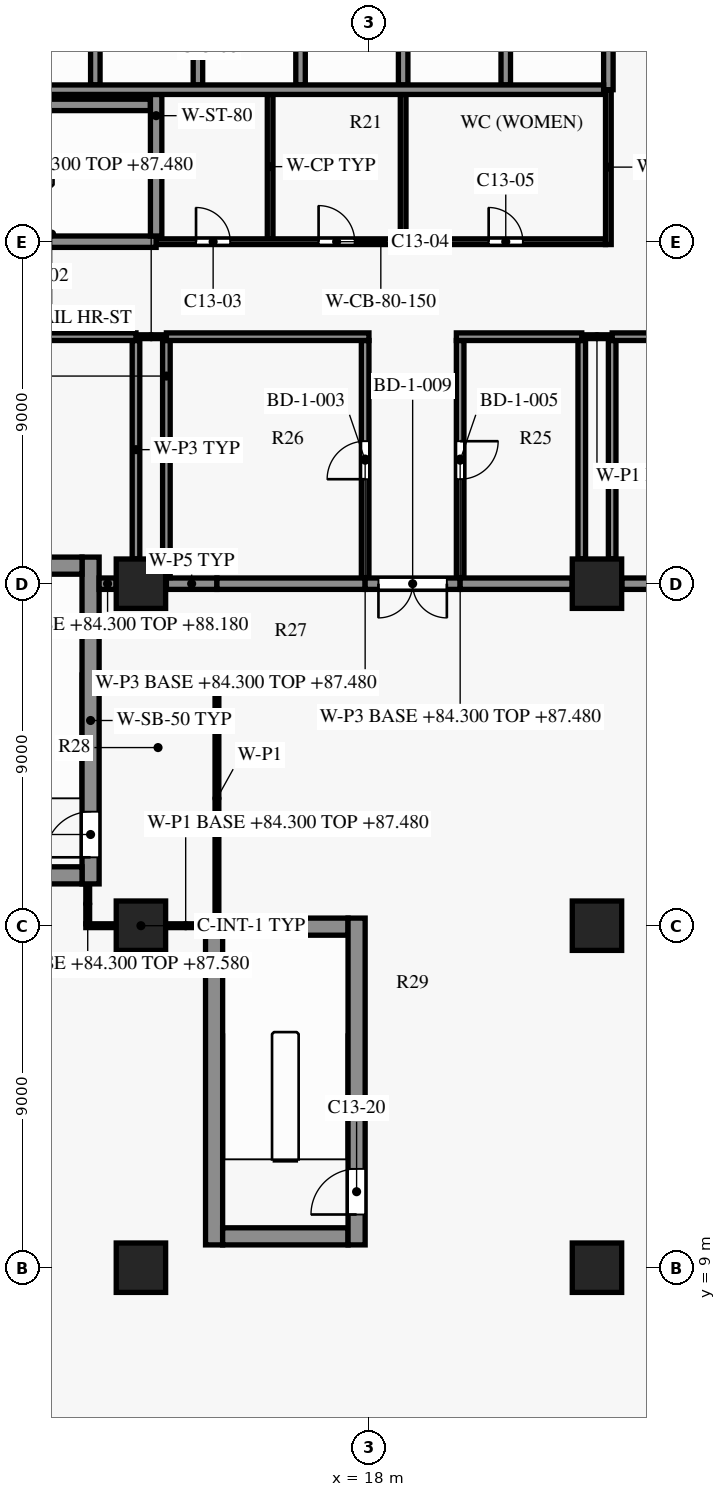
"""IFC4 building model, lengths in metres.
Left out: names, types, materials, properties, quantities, classifications, styles, units other than length and angle.
Written with IfcOpenShell. Run it as: python <this file> out.ifc"""

import sys

from ifc_helpers import new_model, si_unit, direction, frame, frame_2d, origin, origin_2d, place, context, subcontext, project, spatial, rectangle, extrude, element, fill, save


model = new_model("IFC4")
c1 = context("Model", 3, precision=1e-05, world=origin(), true_north=direction((0.0, 1.0)))
c2 = subcontext(c1, "Body", "Model", "MODEL_VIEW")
j1 = project(units=[si_unit("LENGTHUNIT", "METRE"), si_unit("PLANEANGLEUNIT", "RADIAN")], contexts=[c1])
p1 = place(None, origin())
s1 = spatial("IfcSite", under=j1, at=p1, CompositionType="ELEMENT")
p2 = place(p1, origin())
s2 = spatial("IfcBuilding", under=s1, at=p2, CompositionType="ELEMENT")
p3 = place(p2, frame((0.0, 0.0, 84.3)))
s3 = spatial("IfcBuildingStorey", under=s2, at=p3, CompositionType="ELEMENT", Elevation=84.3)
for number, where, z_axis, x_axis in (
    (1, (12.0, 9.0, 0.0), (0.0, 0.0, 1.0), (1.0, 0.0, 0.0)),
    (2, (12.0, 18.0, 0.0), (0.0, 0.0, 1.0), (1.0, 0.0, 0.0)),
    (3, (12.0, 27.0, 0.0), (0.0, 0.0, 1.0), (1.0, 0.0, 0.0)),
    (4, (24.0, 9.0, 0.0), (0.0, 0.0, 1.0), (1.0, 0.0, 0.0)),
    (5, (24.0, 18.0, 0.0), (0.0, 0.0, 1.0), (1.0, 0.0, 0.0)),
    (6, (24.0, 27.0, 0.0), (0.0, 0.0, 1.0), (1.0, 0.0, 0.0)),
):
    element("IfcColumn", number, at=place(p3, frame(where, z_axis=z_axis, x_axis=x_axis)), inside=s3, PredefinedType="COLUMN", context=c2, shape_type="SweptSolid", body=[
        extrude(rectangle(XDim=1.3, YDim=1.3, at=origin_2d()), origin(), (0.0, 0.0, 1.0), 4.2),
    ])
for number, where, z_axis, x_axis in (
    (7, (14.15, 9.825, 0.0), (0.0, 0.0, 1.0), (1.0, 0.0, 0.0)),
    (8, (14.15, 17.975, 0.0), (0.0, 0.0, 1.0), (1.0, 0.0, 0.0)),
    (9, (7.15, 19.325, 0.0), (0.0, 0.0, 1.0), (1.0, 0.0, 0.0)),
    (10, (7.15, 27.475, 0.0), (0.0, 0.0, 1.0), (1.0, 0.0, 0.0)),
):
    element("IfcWall", number, at=place(p3, frame(where, z_axis=z_axis, x_axis=x_axis)), inside=s3, PredefinedType="SHEAR", context=c2, shape_type="SweptSolid", body=[
        extrude(rectangle(XDim=3.3, YDim=0.45, at=frame_2d((1.65, 0.0))), origin(), (0.0, 0.0, 1.0), 3.9),
    ])
p4 = place(p3, frame((12.4, 36.0, 0.0), z_axis=(0.0, 0.0, 1.0), x_axis=(1.0, 0.0, 0.0)))
e11 = element("IfcWall", 11, at=p4, inside=s3, PredefinedType="SHEAR", context=c2, shape_type="SweptSolid", body=[
    extrude(rectangle(XDim=11.825, YDim=0.15, at=frame_2d((5.913, 0.0))), origin(), (0.0, 0.0, 1.0), 3.9),
])
p5 = place(p4, frame((1.05, 0.0, 0.0)))
e12 = element("IfcOpeningElement", 12, at=p5, cuts=e11, PredefinedType="OPENING", context=c2, shape_type="SweptSolid", body=[
    extrude(rectangle(XDim=0.9, YDim=2.1, at=frame_2d((0.45, 1.05))), frame((0.0, 0.085, 0.0), z_axis=(0.0, -1.0, 0.0), x_axis=(1.0, 0.0, 0.0)), (0.0, 0.0, 1.0), 0.17),
])
p6 = place(p4, frame((4.275, 0.0, 0.0)))
e13 = element("IfcOpeningElement", 13, at=p6, cuts=e11, PredefinedType="OPENING", context=c2, shape_type="SweptSolid", body=[
    extrude(rectangle(XDim=0.95, YDim=2.1, at=frame_2d((0.475, 1.05))), frame((0.0, 0.085, 0.0), z_axis=(0.0, -1.0, 0.0), x_axis=(1.0, 0.0, 0.0)), (0.0, 0.0, 1.0), 0.17),
])
p7 = place(p4, frame((8.75, 0.0, 0.0)))
e14 = element("IfcOpeningElement", 14, at=p7, cuts=e11, PredefinedType="OPENING", context=c2, shape_type="SweptSolid", body=[
    extrude(rectangle(XDim=0.9, YDim=2.1, at=frame_2d((0.45, 1.05))), frame((0.0, 0.085, 0.0), z_axis=(0.0, -1.0, 0.0), x_axis=(1.0, 0.0, 0.0)), (0.0, 0.0, 1.0), 0.17),
])
p8 = place(p3, frame((4.55, 36.0, 0.0), z_axis=(0.0, 0.0, 1.0), x_axis=(1.0, 0.0, 0.0)))
e15 = element("IfcWall", 15, at=p8, inside=s3, PredefinedType="SHEAR", context=c2, shape_type="SweptSolid", body=[
    extrude(rectangle(XDim=7.85, YDim=0.3, at=frame_2d((3.925, 0.0))), origin(), (0.0, 0.0, 1.0), 3.9),
])
p9 = place(p8, frame((0.15, 0.0, 0.0)))
e16 = element("IfcOpeningElement", 16, at=p9, cuts=e15, PredefinedType="OPENING", context=c2, shape_type="SweptSolid", body=[
    extrude(rectangle(XDim=1.5, YDim=2.2, at=frame_2d((0.75, 1.1))), frame((0.0, 0.16, 0.0), z_axis=(0.0, -1.0, 0.0), x_axis=(1.0, 0.0, 0.0)), (0.0, 0.0, 1.0), 0.32),
])
p10 = place(p3, frame((4.55, 39.6, 0.0), z_axis=(0.0, 0.0, 1.0), x_axis=(1.0, 0.0, 0.0)))
e17 = element("IfcWall", 17, at=p10, inside=s3, PredefinedType="SHEAR", context=c2, shape_type="SweptSolid", body=[
    extrude(rectangle(XDim=7.7, YDim=0.3, at=frame_2d((3.85, 0.0))), origin(), (0.0, 0.0, 1.0), 3.9),
])
p11 = place(p3, frame((8.1, 40.0, 0.0), z_axis=(0.0, 0.0, 1.0), x_axis=(1.0, 0.0, 0.0)))
e18 = element("IfcWall", 18, at=p11, inside=s3, PredefinedType="SHEAR", context=c2, shape_type="SweptSolid", body=[
    extrude(rectangle(XDim=16.075, YDim=0.25, at=frame_2d((8.038, 0.0))), origin(), (0.0, 0.0, 1.0), 3.9),
])
p12 = place(p3, frame((10.675, 19.1, 0.0), z_axis=(0.0, 0.0, 1.0), x_axis=(0.0, 1.0, 0.0)))
e19 = element("IfcWall", 19, at=p12, inside=s3, PredefinedType="SHEAR", context=c2, shape_type="SweptSolid", body=[
    extrude(rectangle(XDim=8.6, YDim=0.45, at=frame_2d((4.3, 0.0))), origin(), (0.0, 0.0, 1.0), 3.9),
])
p13 = place(p12, frame((0.7, 0.0, 0.0)))
e20 = element("IfcOpeningElement", 20, at=p13, cuts=e19, PredefinedType="OPENING", context=c2, shape_type="SweptSolid", body=[
    extrude(rectangle(XDim=1.2, YDim=2.2, at=frame_2d((0.6, 1.1))), frame((0.0, 0.235, 0.0), z_axis=(0.0, -1.0, 0.0), x_axis=(1.0, 0.0, 0.0)), (0.0, 0.0, 1.0), 0.47),
])
p14 = place(p3, frame((10.8, 40.125, 0.0), z_axis=(0.0, 0.0, 1.0), x_axis=(0.0, 1.0, 0.0)))
e21 = element("IfcWall", 21, at=p14, inside=s3, PredefinedType="SHEAR", context=c2, shape_type="SweptSolid", body=[
    extrude(rectangle(XDim=2.95, YDim=0.25, at=frame_2d((1.475, 0.0))), origin(), (0.0, 0.0, 1.0), 3.9),
])
p15 = place(p3, frame((12.4, 36.15, 0.0), z_axis=(0.0, 0.0, 1.0), x_axis=(0.0, 1.0, 0.0)))
e22 = element("IfcWall", 22, at=p15, inside=s3, PredefinedType="SHEAR", context=c2, shape_type="SweptSolid", body=[
    extrude(rectangle(XDim=3.725, YDim=0.3, at=frame_2d((1.863, 0.0))), origin(), (0.0, 0.0, 1.0), 3.9),
])
p16 = place(p3, frame((13.5, 40.125, 0.0), z_axis=(0.0, 0.0, 1.0), x_axis=(0.0, 1.0, 0.0)))
e23 = element("IfcWall", 23, at=p16, inside=s3, PredefinedType="SHEAR", context=c2, shape_type="SweptSolid", body=[
    extrude(rectangle(XDim=2.95, YDim=0.25, at=frame_2d((1.475, 0.0))), origin(), (0.0, 0.0, 1.0), 3.9),
])
p17 = place(p3, frame((13.925, 9.6, 0.0), z_axis=(0.0, 0.0, 1.0), x_axis=(0.0, 1.0, 0.0)))
e24 = element("IfcWall", 24, at=p17, inside=s3, PredefinedType="SHEAR", context=c2, shape_type="SweptSolid", body=[
    extrude(rectangle(XDim=8.6, YDim=0.45, at=frame_2d((4.3, 0.0))), origin(), (0.0, 0.0, 1.0), 3.9),
])
p18 = place(p3, frame((15.4, 36.075, 0.0), z_axis=(0.0, 0.0, 1.0), x_axis=(0.0, 1.0, 0.0)))
e25 = element("IfcWall", 25, at=p18, inside=s3, PredefinedType="PARTITIONING", context=c2, shape_type="SweptSolid", body=[
    extrude(rectangle(XDim=3.8, YDim=0.15, at=frame_2d((1.9, 0.0))), origin(), (0.0, 0.0, 1.0), 3.9),
])
p19 = place(p3, frame((16.2, 40.125, 0.0), z_axis=(0.0, 0.0, 1.0), x_axis=(0.0, 1.0, 0.0)))
e26 = element("IfcWall", 26, at=p19, inside=s3, PredefinedType="SHEAR", context=c2, shape_type="SweptSolid", body=[
    extrude(rectangle(XDim=2.95, YDim=0.25, at=frame_2d((1.475, 0.0))), origin(), (0.0, 0.0, 1.0), 3.9),
])
p20 = place(p3, frame((17.675, 9.6, 0.0), z_axis=(0.0, 0.0, 1.0), x_axis=(0.0, 1.0, 0.0)))
e27 = element("IfcWall", 27, at=p20, inside=s3, PredefinedType="SHEAR", context=c2, shape_type="SweptSolid", body=[
    extrude(rectangle(XDim=8.6, YDim=0.45, at=frame_2d((4.3, 0.0))), origin(), (0.0, 0.0, 1.0), 3.9),
])
p21 = place(p20, frame((0.8, 0.0, 0.0)))
e28 = element("IfcOpeningElement", 28, at=p21, cuts=e27, PredefinedType="OPENING", context=c2, shape_type="SweptSolid", body=[
    extrude(rectangle(XDim=1.2, YDim=2.2, at=frame_2d((0.6, 1.1))), frame((0.0, 0.235, 0.0), z_axis=(0.0, -1.0, 0.0), x_axis=(1.0, 0.0, 0.0)), (0.0, 0.0, 1.0), 0.47),
])
p22 = place(p3, frame((18.9, 36.075, 0.0), z_axis=(0.0, 0.0, 1.0), x_axis=(0.0, 1.0, 0.0)))
e29 = element("IfcWall", 29, at=p22, inside=s3, PredefinedType="PARTITIONING", context=c2, shape_type="SweptSolid", body=[
    extrude(rectangle(XDim=3.8, YDim=0.15, at=frame_2d((1.9, 0.0))), origin(), (0.0, 0.0, 1.0), 3.9),
])
for number, where, z_axis, x_axis in (
    (30, (18.9, 40.125, 0.0), (0.0, 0.0, 1.0), (0.0, 1.0, 0.0)),
    (31, (21.6, 40.125, 0.0), (0.0, 0.0, 1.0), (0.0, 1.0, 0.0)),
):
    element("IfcWall", number, at=place(p3, frame(where, z_axis=z_axis, x_axis=x_axis)), inside=s3, PredefinedType="SHEAR", context=c2, shape_type="SweptSolid", body=[
        extrude(rectangle(XDim=2.95, YDim=0.25, at=frame_2d((1.475, 0.0))), origin(), (0.0, 0.0, 1.0), 3.9),
    ])
p23 = place(p3, frame((24.3, 35.925, 0.0), z_axis=(0.0, 0.0, 1.0), x_axis=(0.0, 1.0, 0.0)))
e32 = element("IfcWall", 32, at=p23, inside=s3, PredefinedType="SHEAR", context=c2, shape_type="SweptSolid", body=[
    extrude(rectangle(XDim=4.075, YDim=0.15, at=frame_2d((2.038, 0.0))), origin(), (0.0, 0.0, 1.0), 3.9),
])
p24 = place(p3, frame((24.3, 40.0, 0.0), z_axis=(0.0, 0.0, 1.0), x_axis=(0.0, 1.0, 0.0)))
e33 = element("IfcWall", 33, at=p24, inside=s3, PredefinedType="SHEAR", context=c2, shape_type="SweptSolid", body=[
    extrude(rectangle(XDim=3.325, YDim=0.25, at=frame_2d((1.663, 0.0))), origin(), (0.0, 0.0, 1.0), 3.9),
])
p25 = place(p3, frame((11.345, 18.0, 0.0), z_axis=(0.0, 0.0, 1.0), x_axis=(-1.0, 0.0, 0.0)))
e34 = element("IfcWall", 34, at=p25, inside=s3, PredefinedType="PARTITIONING", context=c2, shape_type="SweptSolid", body=[
    extrude(rectangle(XDim=0.795, YDim=0.1, at=frame_2d((0.397, 0.0))), origin(), (0.0, 0.0, 1.0), 3.28),
])
p26 = place(p3, frame((13.7, 18.0, 0.0), z_axis=(0.0, 0.0, 1.0), x_axis=(-1.0, 0.0, 0.0)))
e35 = element("IfcWall", 35, at=p26, inside=s3, PredefinedType="PARTITIONING", context=c2, shape_type="SweptSolid", body=[
    extrude(rectangle(XDim=1.045, YDim=0.1, at=frame_2d((0.522, 0.0))), origin(), (0.0, 0.0, 1.0), 3.18),
])
p27 = place(p3, frame((10.6, 18.05, 0.0), z_axis=(0.0, 0.0, 1.0), x_axis=(0.0, 1.0, 0.0)))
e36 = element("IfcWall", 36, at=p27, inside=s3, PredefinedType="PARTITIONING", context=c2, shape_type="SweptSolid", body=[
    extrude(rectangle(XDim=1.05, YDim=0.1, at=frame_2d((0.525, 0.0))), origin(), (0.0, 0.0, 1.0), 3.28),
])
p28 = place(p3, frame((14.0, 24.5, 0.0), z_axis=(0.0, 0.0, 1.0), x_axis=(0.0, -1.0, 0.0)))
e37 = element("IfcWall", 37, at=p28, inside=s3, PredefinedType="PARTITIONING", context=c2, shape_type="SweptSolid", body=[
    extrude(rectangle(XDim=6.3, YDim=0.1, at=frame_2d((3.15, 0.0))), origin(), (0.0, 0.0, 1.0), 3.88),
])
p29 = place(p3, frame((10.9, 27.0, 0.0), z_axis=(0.0, 0.0, 1.0), x_axis=(1.0, 0.0, 0.0)))
e38 = element("IfcWall", 38, at=p29, inside=s3, PredefinedType="PARTITIONING", context=c2, shape_type="SweptSolid", body=[
    extrude(rectangle(XDim=0.445, YDim=0.3, at=frame_2d((0.223, 0.0))), origin(), (0.0, 0.0, 1.0), 3.88),
])
p30 = place(p3, frame((12.67, 27.0, 0.0), z_axis=(0.0, 0.0, 1.0), x_axis=(1.0, 0.0, 0.0)))
e39 = element("IfcWall", 39, at=p30, inside=s3, PredefinedType="PARTITIONING", context=c2, shape_type="SweptSolid", body=[
    extrude(rectangle(XDim=1.33, YDim=0.3, at=frame_2d((0.665, 0.0))), origin(), (0.0, 0.0, 1.0), 3.18),
])
p31 = place(p3, frame((17.9, 27.0, 0.0), z_axis=(0.0, 0.0, 1.0), x_axis=(-1.0, 0.0, 0.0)))
e40 = element("IfcWall", 40, at=p31, inside=s3, PredefinedType="PARTITIONING", context=c2, shape_type="SweptSolid", body=[
    extrude(rectangle(XDim=3.9, YDim=0.3, at=frame_2d((1.95, 0.0))), origin(), (0.0, 0.0, 1.0), 3.18),
])
p32 = place(p3, frame((20.4, 27.0, 0.0), z_axis=(0.0, 0.0, 1.0), x_axis=(-1.0, 0.0, 0.0)))
e41 = element("IfcWall", 41, at=p32, inside=s3, PredefinedType="PARTITIONING", context=c2, shape_type="SweptSolid", body=[
    extrude(rectangle(XDim=2.5, YDim=0.3, at=frame_2d((1.25, 0.0))), origin(), (0.0, 0.0, 1.0), 3.18),
])
p33 = place(p32, frame((0.35, 0.0, 0.0)))
e42 = element("IfcOpeningElement", 42, at=p33, cuts=e41, PredefinedType="OPENING", context=c2, shape_type="SweptSolid", body=[
    extrude(rectangle(XDim=1.8, YDim=2.1, at=frame_2d((0.9, 1.05))), frame((0.0, 0.16, 0.0), z_axis=(0.0, -1.0, 0.0), x_axis=(1.0, 0.0, 0.0)), (0.0, 0.0, 1.0), 0.32),
])
p34 = place(p3, frame((23.345, 27.0, 0.0), z_axis=(0.0, 0.0, 1.0), x_axis=(-1.0, 0.0, 0.0)))
e43 = element("IfcWall", 43, at=p34, inside=s3, PredefinedType="PARTITIONING", context=c2, shape_type="SweptSolid", body=[
    extrude(rectangle(XDim=2.945, YDim=0.3, at=frame_2d((1.473, 0.0))), origin(), (0.0, 0.0, 1.0), 3.18),
])
p35 = place(p3, frame((33.1, 27.0, 0.0), z_axis=(0.0, 0.0, 1.0), x_axis=(-1.0, 0.0, 0.0)))
e44 = element("IfcWall", 44, at=p35, inside=s3, PredefinedType="PARTITIONING", context=c2, shape_type="SweptSolid", body=[
    extrude(rectangle(XDim=8.445, YDim=0.3, at=frame_2d((4.223, 0.0))), origin(), (0.0, 0.0, 1.0), 3.18),
])
p36 = place(p3, frame((12.67, 27.16, 0.0), z_axis=(0.0, 0.0, 1.0), x_axis=(0.0, 1.0, 0.0)))
e45 = element("IfcWall", 45, at=p36, inside=s3, PredefinedType="PARTITIONING", context=c2, shape_type="SweptSolid", body=[
    extrude(rectangle(XDim=6.24, YDim=0.2, at=frame_2d((3.12, 0.0))), origin(), (0.0, 0.0, 1.0), 3.18),
])
p37 = place(p3, frame((17.9, 27.16, 0.0), z_axis=(0.0, 0.0, 1.0), x_axis=(0.0, 1.0, 0.0)))
e46 = element("IfcWall", 46, at=p37, inside=s3, PredefinedType="PARTITIONING", context=c2, shape_type="SweptSolid", body=[
    extrude(rectangle(XDim=6.24, YDim=0.2, at=frame_2d((3.12, 0.0))), origin(), (0.0, 0.0, 1.0), 3.18),
])
p38 = place(p37, frame((2.59, 0.0, 0.0)))
e47 = element("IfcOpeningElement", 47, at=p38, cuts=e46, PredefinedType="OPENING", context=c2, shape_type="SweptSolid", body=[
    extrude(rectangle(XDim=1.0, YDim=2.1, at=frame_2d((0.5, 1.05))), frame((0.0, 0.11, 0.0), z_axis=(0.0, -1.0, 0.0), x_axis=(1.0, 0.0, 0.0)), (0.0, 0.0, 1.0), 0.22),
])
for number, where, z_axis, x_axis in (
    (48, (24.4, 27.655, 0.0), (0.0, 0.0, 1.0), (0.0, 1.0, 0.0)),
    (49, (11.87, 33.4, 0.0), (0.0, 0.0, 1.0), (0.0, -1.0, 0.0)),
):
    element("IfcWall", number, at=place(p3, frame(where, z_axis=z_axis, x_axis=x_axis)), inside=s3, PredefinedType="PARTITIONING", context=c2, shape_type="SweptSolid", body=[
        extrude(rectangle(XDim=5.745, YDim=0.2, at=frame_2d((2.873, 0.0))), origin(), (0.0, 0.0, 1.0), 3.88),
    ])
p39 = place(p3, frame((20.4, 33.4, 0.0), z_axis=(0.0, 0.0, 1.0), x_axis=(0.0, -1.0, 0.0)))
e50 = element("IfcWall", 50, at=p39, inside=s3, PredefinedType="PARTITIONING", context=c2, shape_type="SweptSolid", body=[
    extrude(rectangle(XDim=6.24, YDim=0.2, at=frame_2d((3.12, 0.0))), origin(), (0.0, 0.0, 1.0), 3.18),
])
p40 = place(p39, frame((2.65, 0.0, 0.0)))
e51 = element("IfcOpeningElement", 51, at=p40, cuts=e50, PredefinedType="OPENING", context=c2, shape_type="SweptSolid", body=[
    extrude(rectangle(XDim=1.0, YDim=2.1, at=frame_2d((0.5, 1.05))), frame((0.0, 0.11, 0.0), z_axis=(0.0, -1.0, 0.0), x_axis=(1.0, 0.0, 0.0)), (0.0, 0.0, 1.0), 0.22),
])
p41 = place(p3, frame((23.6, 33.4, 0.0), z_axis=(0.0, 0.0, 1.0), x_axis=(0.0, -1.0, 0.0)))
e52 = element("IfcWall", 52, at=p41, inside=s3, PredefinedType="PARTITIONING", context=c2, shape_type="SweptSolid", body=[
    extrude(rectangle(XDim=5.745, YDim=0.2, at=frame_2d((2.873, 0.0))), origin(), (0.0, 0.0, 1.0), 3.88),
])
p42 = place(p3, frame((11.87, 33.5, 0.0), z_axis=(0.0, 0.0, 1.0), x_axis=(-1.0, 0.0, 0.0)))
e53 = element("IfcWall", 53, at=p42, inside=s3, PredefinedType="PARTITIONING", context=c2, shape_type="SweptSolid", body=[
    extrude(rectangle(XDim=5.47, YDim=0.2, at=frame_2d((2.735, 0.0))), origin(), (0.0, 0.0, 1.0), 3.88),
])
p43 = place(p42, frame((2.295, 0.0, 0.0)))
e54 = element("IfcOpeningElement", 54, at=p43, cuts=e53, PredefinedType="OPENING", context=c2, shape_type="SweptSolid", body=[
    extrude(rectangle(XDim=1.0, YDim=2.1, at=frame_2d((0.5, 1.05))), frame((0.0, 0.11, 0.0), z_axis=(0.0, -1.0, 0.0), x_axis=(1.0, 0.0, 0.0)), (0.0, 0.0, 1.0), 0.22),
])
p44 = place(p3, frame((12.67, 33.5, 0.0), z_axis=(0.0, 0.0, 1.0), x_axis=(-1.0, 0.0, 0.0)))
e55 = element("IfcWall", 55, at=p44, inside=s3, PredefinedType="PARTITIONING", context=c2, shape_type="SweptSolid", body=[
    extrude(rectangle(XDim=0.8, YDim=0.1, at=frame_2d((0.4, 0.0))), origin(), (0.0, 0.0, 1.0), 3.18),
])
p45 = place(p3, frame((18.0, 33.5, 0.0), z_axis=(0.0, 0.0, 1.0), x_axis=(-1.0, 0.0, 0.0)))
e56 = element("IfcWall", 56, at=p45, inside=s3, PredefinedType="PARTITIONING", context=c2, shape_type="SweptSolid", body=[
    extrude(rectangle(XDim=5.33, YDim=0.2, at=frame_2d((2.665, 0.0))), origin(), (0.0, 0.0, 1.0), 3.88),
])
p46 = place(p3, frame((23.6, 33.5, 0.0), z_axis=(0.0, 0.0, 1.0), x_axis=(-1.0, 0.0, 0.0)))
e57 = element("IfcWall", 57, at=p46, inside=s3, PredefinedType="PARTITIONING", context=c2, shape_type="SweptSolid", body=[
    extrude(rectangle(XDim=3.3, YDim=0.2, at=frame_2d((1.65, 0.0))), origin(), (0.0, 0.0, 1.0), 3.88),
])
p47 = place(p3, frame((24.4, 33.5, 0.0), z_axis=(0.0, 0.0, 1.0), x_axis=(-1.0, 0.0, 0.0)))
e58 = element("IfcWall", 58, at=p47, inside=s3, PredefinedType="PARTITIONING", context=c2, shape_type="SweptSolid", body=[
    extrude(rectangle(XDim=0.8, YDim=0.1, at=frame_2d((0.4, 0.0))), origin(), (0.0, 0.0, 1.0), 3.18),
])
p48 = place(p3, frame((31.6, 33.5, 0.0), z_axis=(0.0, 0.0, 1.0), x_axis=(-1.0, 0.0, 0.0)))
e59 = element("IfcWall", 59, at=p48, inside=s3, PredefinedType="PARTITIONING", context=c2, shape_type="SweptSolid", body=[
    extrude(rectangle(XDim=7.2, YDim=0.2, at=frame_2d((3.6, 0.0))), origin(), (0.0, 0.0, 1.0), 3.88),
])
p49 = place(p48, frame((3.15, 0.0, 0.0)))
e60 = element("IfcOpeningElement", 60, at=p49, cuts=e59, PredefinedType="OPENING", context=c2, shape_type="SweptSolid", body=[
    extrude(rectangle(XDim=1.0, YDim=2.1, at=frame_2d((0.5, 1.05))), frame((0.0, 0.11, 0.0), z_axis=(0.0, -1.0, 0.0), x_axis=(1.0, 0.0, 0.0)), (0.0, 0.0, 1.0), 0.22),
])
p50 = place(p5, origin())
e61 = element("IfcDoor", 61, at=p50, inside=s3, OperationType="SINGLE_SWING_RIGHT", PredefinedType="DOOR", context=c2, shape_type="SweptSolid", body=[
    extrude(rectangle(XDim=0.9, YDim=2.1, at=frame_2d((0.45, 1.05))), frame((0.0, 0.025, 0.0), z_axis=(0.0, -1.0, 0.0), x_axis=(1.0, 0.0, 0.0)), (0.0, 0.0, 1.0), 0.05),
])
fill(e12, e61)
p51 = place(p6, origin())
e62 = element("IfcDoor", 62, at=p51, inside=s3, OperationType="SINGLE_SWING_LEFT", PredefinedType="DOOR", context=c2, shape_type="SweptSolid", body=[
    extrude(rectangle(XDim=0.95, YDim=2.1, at=frame_2d((0.475, 1.05))), frame((0.0, 0.025, 0.0), z_axis=(0.0, -1.0, 0.0), x_axis=(1.0, 0.0, 0.0)), (0.0, 0.0, 1.0), 0.05),
])
fill(e13, e62)
p52 = place(p7, origin())
e63 = element("IfcDoor", 63, at=p52, inside=s3, OperationType="SINGLE_SWING_RIGHT", PredefinedType="DOOR", context=c2, shape_type="SweptSolid", body=[
    extrude(rectangle(XDim=0.9, YDim=2.1, at=frame_2d((0.45, 1.05))), frame((0.0, 0.025, 0.0), z_axis=(0.0, -1.0, 0.0), x_axis=(1.0, 0.0, 0.0)), (0.0, 0.0, 1.0), 0.05),
])
fill(e14, e63)
p53 = place(p13, origin())
e64 = element("IfcDoor", 64, at=p53, inside=s3, OperationType="SINGLE_SWING_RIGHT", PredefinedType="DOOR", context=c2, shape_type="SweptSolid", body=[
    extrude(rectangle(XDim=1.2, YDim=2.2, at=frame_2d((0.6, 1.1))), frame((0.0, 0.025, 0.0), z_axis=(0.0, -1.0, 0.0), x_axis=(1.0, 0.0, 0.0)), (0.0, 0.0, 1.0), 0.05),
])
fill(e20, e64)
p54 = place(p21, origin())
e65 = element("IfcDoor", 65, at=p54, inside=s3, OperationType="SINGLE_SWING_LEFT", PredefinedType="DOOR", context=c2, shape_type="SweptSolid", body=[
    extrude(rectangle(XDim=1.2, YDim=2.2, at=frame_2d((0.6, 1.1))), frame((0.0, 0.025, 0.0), z_axis=(0.0, -1.0, 0.0), x_axis=(1.0, 0.0, 0.0)), (0.0, 0.0, 1.0), 0.05),
])
fill(e28, e65)
p55 = place(p38, origin())
e66 = element("IfcDoor", 66, at=p55, inside=s3, OperationType="SINGLE_SWING_RIGHT", PredefinedType="DOOR", context=c2, shape_type="SweptSolid", body=[
    extrude(rectangle(XDim=1.0, YDim=2.1, at=frame_2d((0.5, 1.05))), frame((0.0, 0.025, 0.0), z_axis=(0.0, -1.0, 0.0), x_axis=(1.0, 0.0, 0.0)), (0.0, 0.0, 1.0), 0.05),
])
fill(e47, e66)
p56 = place(p40, origin())
e67 = element("IfcDoor", 67, at=p56, inside=s3, OperationType="SINGLE_SWING_LEFT", PredefinedType="DOOR", context=c2, shape_type="SweptSolid", body=[
    extrude(rectangle(XDim=1.0, YDim=2.1, at=frame_2d((0.5, 1.05))), frame((0.0, 0.025, 0.0), z_axis=(0.0, -1.0, 0.0), x_axis=(1.0, 0.0, 0.0)), (0.0, 0.0, 1.0), 0.05),
])
fill(e51, e67)
p57 = place(p33, origin())
e68 = element("IfcDoor", 68, at=p57, inside=s3, OperationType="DOUBLE_DOOR_SINGLE_SWING", PredefinedType="DOOR", context=c2, shape_type="SweptSolid", body=[
    extrude(rectangle(XDim=1.8, YDim=2.1, at=frame_2d((0.9, 1.05))), frame((0.0, 0.025, 0.0), z_axis=(0.0, -1.0, 0.0), x_axis=(1.0, 0.0, 0.0)), (0.0, 0.0, 1.0), 0.05),
])
fill(e42, e68)
save(model, sys.argv[1])
